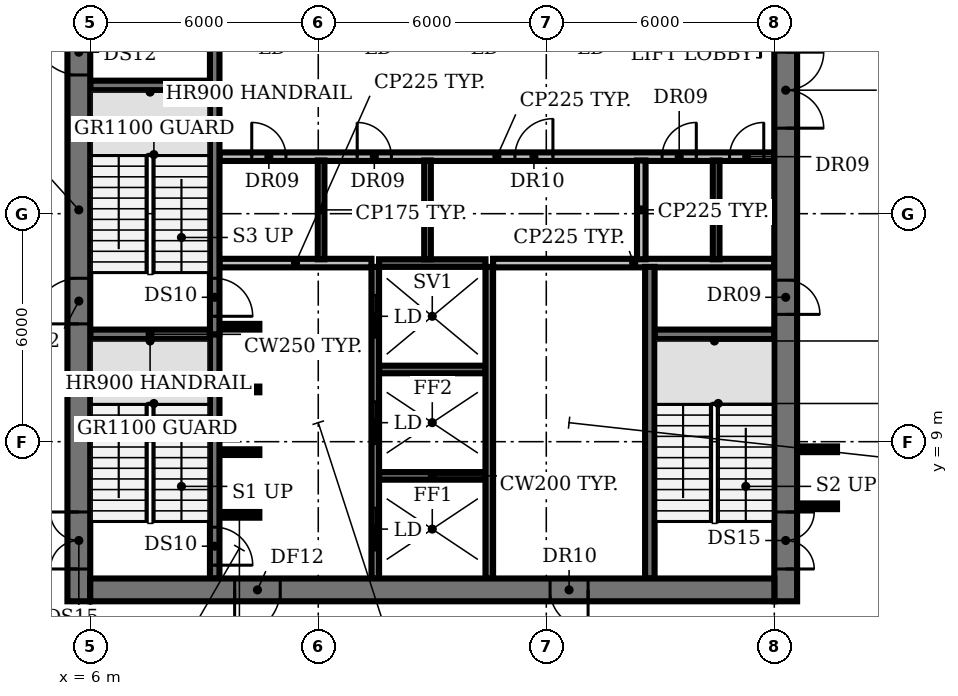
"""IFC4 building model, lengths in metres.
Left out: names, types, materials, properties, quantities, classifications, styles, units other than length and angle.
Written with IfcOpenShell. Run it as: python <this file> out.ifc"""

import sys

from ifc_helpers import new_model, si_unit, direction, frame, frame_2d, origin, place, context, subcontext, project, spatial, rectangle, extrude, element, fill, save


model = new_model("IFC4")
c1 = context("Model", 3, precision=1e-05, world=origin(), true_north=direction((0.0, 1.0)))
c2 = subcontext(c1, "Body", "Model", "MODEL_VIEW")
j1 = project(units=[si_unit("LENGTHUNIT", "METRE"), si_unit("PLANEANGLEUNIT", "RADIAN")], contexts=[c1])
p1 = place(None, origin())
s1 = spatial("IfcSite", under=j1, at=p1, CompositionType="ELEMENT")
p2 = place(p1, origin())
s2 = spatial("IfcBuilding", under=s1, at=p2, CompositionType="ELEMENT")
p3 = place(p2, frame((0.0, 0.0, 159.2)))
s3 = spatial("IfcBuildingStorey", under=s2, at=p3, CompositionType="ELEMENT", Elevation=159.2)
p4 = place(p3, frame((9.4, 7.075, 0.0), z_axis=(0.0, 0.0, 1.0), x_axis=(1.0, 0.0, 0.0)))
e1 = element("IfcWall", 1, at=p4, inside=s3, PredefinedType="SHEAR", context=c2, shape_type="SweptSolid", body=[
    extrude(rectangle(XDim=1.05, YDim=0.15, at=frame_2d((0.525, 0.0))), origin(), (0.0, 0.0, 1.0), 3.85),
])
p5 = place(p3, frame((13.6, 8.1, 0.0), z_axis=(0.0, 0.0, 1.0), x_axis=(1.0, 0.0, 0.0)))
e2 = element("IfcWall", 2, at=p5, inside=s3, PredefinedType="SHEAR", context=c2, shape_type="SweptSolid", body=[
    extrude(rectangle(XDim=2.8, YDim=0.2, at=frame_2d((1.4, 0.0))), origin(), (0.0, 0.0, 1.0), 3.85),
])
for number, where, z_axis, x_axis in (
    (3, (9.4, 8.725, 0.0), (0.0, 0.0, 1.0), (1.0, 0.0, 0.0)),
    (4, (9.4, 10.375, 0.0), (0.0, 0.0, 1.0), (1.0, 0.0, 0.0)),
):
    element("IfcWall", number, at=place(p3, frame(where, z_axis=z_axis, x_axis=x_axis)), inside=s3, PredefinedType="SHEAR", context=c2, shape_type="SweptSolid", body=[
        extrude(rectangle(XDim=1.05, YDim=0.15, at=frame_2d((0.525, 0.0))), origin(), (0.0, 0.0, 1.0), 3.85),
    ])
p6 = place(p3, frame((13.6, 10.9, 0.0), z_axis=(0.0, 0.0, 1.0), x_axis=(1.0, 0.0, 0.0)))
e5 = element("IfcWall", 5, at=p6, inside=s3, PredefinedType="SHEAR", context=c2, shape_type="SweptSolid", body=[
    extrude(rectangle(XDim=2.8, YDim=0.2, at=frame_2d((1.4, 0.0))), origin(), (0.0, 0.0, 1.0), 3.85),
])
for number, where, z_axis, x_axis in (
    (6, (6.0, 11.825, 0.0), (0.0, 0.0, 1.0), (1.0, 0.0, 0.0)),
    (7, (20.85, 11.825, 0.0), (0.0, 0.0, 1.0), (1.0, 0.0, 0.0)),
):
    element("IfcWall", number, at=place(p3, frame(where, z_axis=z_axis, x_axis=x_axis)), inside=s3, PredefinedType="SHEAR", context=c2, shape_type="SweptSolid", body=[
        extrude(rectangle(XDim=3.15, YDim=0.25, at=frame_2d((1.575, 0.0))), origin(), (0.0, 0.0, 1.0), 3.85),
    ])
p7 = place(p3, frame((9.4, 12.025, 0.0), z_axis=(0.0, 0.0, 1.0), x_axis=(1.0, 0.0, 0.0)))
e8 = element("IfcWall", 8, at=p7, inside=s3, PredefinedType="SHEAR", context=c2, shape_type="SweptSolid", body=[
    extrude(rectangle(XDim=1.05, YDim=0.15, at=frame_2d((0.525, 0.0))), origin(), (0.0, 0.0, 1.0), 3.85),
])
p8 = place(p3, frame((9.4, 13.7, 0.0), z_axis=(0.0, 0.0, 1.0), x_axis=(1.0, 0.0, 0.0)))
e9 = element("IfcWall", 9, at=p8, inside=s3, PredefinedType="PARTITIONING", context=c2, shape_type="SweptSolid", body=[
    extrude(rectangle(XDim=4.0, YDim=0.225, at=frame_2d((2.0, 0.0))), origin(), (0.0, 0.0, 1.0), 3.85),
])
p9 = place(p3, frame((13.6, 13.7, 0.0), z_axis=(0.0, 0.0, 1.0), x_axis=(1.0, 0.0, 0.0)))
e10 = element("IfcWall", 10, at=p9, inside=s3, PredefinedType="SHEAR", context=c2, shape_type="SweptSolid", body=[
    extrude(rectangle(XDim=2.8, YDim=0.2, at=frame_2d((1.4, 0.0))), origin(), (0.0, 0.0, 1.0), 3.85),
])
p10 = place(p3, frame((16.6, 13.7, 0.0), z_axis=(0.0, 0.0, 1.0), x_axis=(1.0, 0.0, 0.0)))
e11 = element("IfcWall", 11, at=p10, inside=s3, PredefinedType="PARTITIONING", context=c2, shape_type="SweptSolid", body=[
    extrude(rectangle(XDim=7.4, YDim=0.225, at=frame_2d((3.7, 0.0))), origin(), (0.0, 0.0, 1.0), 3.85),
])
p11 = place(p3, frame((9.4, 16.5, 0.0), z_axis=(0.0, 0.0, 1.0), x_axis=(1.0, 0.0, 0.0)))
e12 = element("IfcWall", 12, at=p11, inside=s3, PredefinedType="PARTITIONING", context=c2, shape_type="SweptSolid", body=[
    extrude(rectangle(XDim=14.6, YDim=0.225, at=frame_2d((7.3, 0.0))), origin(), (0.0, 0.0, 1.0), 3.85),
])
p12 = place(p11, frame((0.85, 0.0, 0.0)))
e13 = element("IfcOpeningElement", 13, at=p12, cuts=e12, PredefinedType="OPENING", context=c2, shape_type="SweptSolid", body=[
    extrude(rectangle(XDim=0.9, YDim=2.1, at=frame_2d((0.45, 1.05))), frame((0.0, 0.123, 0.0), z_axis=(0.0, -1.0, 0.0), x_axis=(1.0, 0.0, 0.0)), (0.0, 0.0, 1.0), 0.245),
])
p13 = place(p11, frame((3.625, 0.0, 0.0)))
e14 = element("IfcOpeningElement", 14, at=p13, cuts=e12, PredefinedType="OPENING", context=c2, shape_type="SweptSolid", body=[
    extrude(rectangle(XDim=0.9, YDim=2.1, at=frame_2d((0.45, 1.05))), frame((0.0, 0.123, 0.0), z_axis=(0.0, -1.0, 0.0), x_axis=(1.0, 0.0, 0.0)), (0.0, 0.0, 1.0), 0.245),
])
p14 = place(p11, frame((7.775, 0.0, 0.0)))
e15 = element("IfcOpeningElement", 15, at=p14, cuts=e12, PredefinedType="OPENING", context=c2, shape_type="SweptSolid", body=[
    extrude(rectangle(XDim=1.0, YDim=2.1, at=frame_2d((0.5, 1.05))), frame((0.0, 0.123, 0.0), z_axis=(0.0, -1.0, 0.0), x_axis=(1.0, 0.0, 0.0)), (0.0, 0.0, 1.0), 0.245),
])
p15 = place(p11, frame((11.647, 0.0, 0.0)))
e16 = element("IfcOpeningElement", 16, at=p15, cuts=e12, PredefinedType="OPENING", context=c2, shape_type="SweptSolid", body=[
    extrude(rectangle(XDim=0.9, YDim=2.1, at=frame_2d((0.45, 1.05))), frame((0.0, 0.123, 0.0), z_axis=(0.0, -1.0, 0.0), x_axis=(1.0, 0.0, 0.0)), (0.0, 0.0, 1.0), 0.245),
])
p16 = place(p11, frame((13.423, 0.0, 0.0)))
e17 = element("IfcOpeningElement", 17, at=p16, cuts=e12, PredefinedType="OPENING", context=c2, shape_type="SweptSolid", body=[
    extrude(rectangle(XDim=0.9, YDim=2.1, at=frame_2d((0.45, 1.05))), frame((0.0, 0.123, 0.0), z_axis=(0.0, -1.0, 0.0), x_axis=(1.0, 0.0, 0.0)), (0.0, 0.0, 1.0), 0.245),
])
p17 = place(p3, frame((6.0, 18.375, 0.0), z_axis=(0.0, 0.0, 1.0), x_axis=(1.0, 0.0, 0.0)))
e18 = element("IfcWall", 18, at=p17, inside=s3, PredefinedType="SHEAR", context=c2, shape_type="SweptSolid", body=[
    extrude(rectangle(XDim=3.15, YDim=0.25, at=frame_2d((1.575, 0.0))), origin(), (0.0, 0.0, 1.0), 3.85),
])
p18 = place(p3, frame((9.275, 11.825, 0.0), z_axis=(0.0, 0.0, 1.0), x_axis=(0.0, -1.0, 0.0)))
e19 = element("IfcWall", 19, at=p18, inside=s3, PredefinedType="SHEAR", context=c2, shape_type="SweptSolid", body=[
    extrude(rectangle(XDim=6.425, YDim=0.25, at=frame_2d((3.212, 0.0))), origin(), (0.0, 0.0, 1.0), 3.85),
])
p19 = place(p18, frame((5.075, 0.0, 0.0)))
e20 = element("IfcOpeningElement", 20, at=p19, cuts=e19, PredefinedType="OPENING", context=c2, shape_type="SweptSolid", body=[
    extrude(rectangle(XDim=1.0, YDim=2.1, at=frame_2d((0.5, 1.05))), frame((0.0, 0.135, 0.0), z_axis=(0.0, -1.0, 0.0), x_axis=(1.0, 0.0, 0.0)), (0.0, 0.0, 1.0), 0.27),
])
p20 = place(p3, frame((9.275, 18.375, 0.0), z_axis=(0.0, 0.0, 1.0), x_axis=(0.0, -1.0, 0.0)))
e21 = element("IfcWall", 21, at=p20, inside=s3, PredefinedType="SHEAR", context=c2, shape_type="SweptSolid", body=[
    extrude(rectangle(XDim=6.55, YDim=0.25, at=frame_2d((3.275, 0.0))), origin(), (0.0, 0.0, 1.0), 3.85),
])
p21 = place(p20, frame((5.075, 0.0, 0.0)))
e22 = element("IfcOpeningElement", 22, at=p21, cuts=e21, PredefinedType="OPENING", context=c2, shape_type="SweptSolid", body=[
    extrude(rectangle(XDim=1.0, YDim=2.1, at=frame_2d((0.5, 1.05))), frame((0.0, 0.135, 0.0), z_axis=(0.0, -1.0, 0.0), x_axis=(1.0, 0.0, 0.0)), (0.0, 0.0, 1.0), 0.27),
])
p22 = place(p3, frame((9.275, 18.375, 0.0), z_axis=(0.0, 0.0, 1.0), x_axis=(0.0, 1.0, 0.0)))
e23 = element("IfcWall", 23, at=p22, inside=s3, PredefinedType="SHEAR", context=c2, shape_type="SweptSolid", body=[
    extrude(rectangle(XDim=6.425, YDim=0.25, at=frame_2d((3.212, 0.0))), origin(), (0.0, 0.0, 1.0), 3.85),
])
p23 = place(p3, frame((12.075, 13.8, 0.0), z_axis=(0.0, 0.0, 1.0), x_axis=(0.0, 1.0, 0.0)))
e24 = element("IfcWall", 24, at=p23, inside=s3, PredefinedType="PARTITIONING", context=c2, shape_type="SweptSolid", body=[
    extrude(rectangle(XDim=2.6, YDim=0.175, at=frame_2d((1.3, 0.0))), origin(), (0.0, 0.0, 1.0), 3.85),
])
p24 = place(p3, frame((13.5, 5.4, 0.0), z_axis=(0.0, 0.0, 1.0), x_axis=(0.0, 1.0, 0.0)))
e25 = element("IfcWall", 25, at=p24, inside=s3, PredefinedType="SHEAR", context=c2, shape_type="SweptSolid", body=[
    extrude(rectangle(XDim=8.2, YDim=0.2, at=frame_2d((4.1, 0.0))), origin(), (0.0, 0.0, 1.0), 3.85),
])
p25 = place(p24, frame((0.75, 0.0, 0.0)))
e26 = element("IfcOpeningElement", 26, at=p25, cuts=e25, PredefinedType="OPENING", context=c2, shape_type="SweptSolid", body=[
    extrude(rectangle(XDim=1.1, YDim=2.1, at=frame_2d((0.55, 1.05))), frame((0.0, 0.11, 0.0), z_axis=(0.0, -1.0, 0.0), x_axis=(1.0, 0.0, 0.0)), (0.0, 0.0, 1.0), 0.22),
])
p26 = place(p24, frame((3.55, 0.0, 0.0)))
e27 = element("IfcOpeningElement", 27, at=p26, cuts=e25, PredefinedType="OPENING", context=c2, shape_type="SweptSolid", body=[
    extrude(rectangle(XDim=1.1, YDim=2.1, at=frame_2d((0.55, 1.05))), frame((0.0, 0.11, 0.0), z_axis=(0.0, -1.0, 0.0), x_axis=(1.0, 0.0, 0.0)), (0.0, 0.0, 1.0), 0.22),
])
p27 = place(p24, frame((6.35, 0.0, 0.0)))
e28 = element("IfcOpeningElement", 28, at=p27, cuts=e25, PredefinedType="OPENING", context=c2, shape_type="SweptSolid", body=[
    extrude(rectangle(XDim=1.1, YDim=2.1, at=frame_2d((0.55, 1.05))), frame((0.0, 0.11, 0.0), z_axis=(0.0, -1.0, 0.0), x_axis=(1.0, 0.0, 0.0)), (0.0, 0.0, 1.0), 0.22),
])
p28 = place(p3, frame((14.875, 13.8, 0.0), z_axis=(0.0, 0.0, 1.0), x_axis=(0.0, 1.0, 0.0)))
e29 = element("IfcWall", 29, at=p28, inside=s3, PredefinedType="PARTITIONING", context=c2, shape_type="SweptSolid", body=[
    extrude(rectangle(XDim=2.6, YDim=0.175, at=frame_2d((1.3, 0.0))), origin(), (0.0, 0.0, 1.0), 3.85),
])
p29 = place(p3, frame((16.5, 5.4, 0.0), z_axis=(0.0, 0.0, 1.0), x_axis=(0.0, 1.0, 0.0)))
e30 = element("IfcWall", 30, at=p29, inside=s3, PredefinedType="SHEAR", context=c2, shape_type="SweptSolid", body=[
    extrude(rectangle(XDim=8.2, YDim=0.2, at=frame_2d((4.1, 0.0))), origin(), (0.0, 0.0, 1.0), 3.85),
])
p30 = place(p3, frame((20.5, 13.8, 0.0), z_axis=(0.0, 0.0, 1.0), x_axis=(0.0, 1.0, 0.0)))
e31 = element("IfcWall", 31, at=p30, inside=s3, PredefinedType="PARTITIONING", context=c2, shape_type="SweptSolid", body=[
    extrude(rectangle(XDim=2.6, YDim=0.225, at=frame_2d((1.3, 0.0))), origin(), (0.0, 0.0, 1.0), 3.85),
])
p31 = place(p3, frame((20.725, 5.4, 0.0), z_axis=(0.0, 0.0, 1.0), x_axis=(0.0, 1.0, 0.0)))
e32 = element("IfcWall", 32, at=p31, inside=s3, PredefinedType="SHEAR", context=c2, shape_type="SweptSolid", body=[
    extrude(rectangle(XDim=8.2, YDim=0.25, at=frame_2d((4.1, 0.0))), origin(), (0.0, 0.0, 1.0), 3.85),
])
p32 = place(p3, frame((22.47, 13.8, 0.0), z_axis=(0.0, 0.0, 1.0), x_axis=(0.0, 1.0, 0.0)))
e33 = element("IfcWall", 33, at=p32, inside=s3, PredefinedType="PARTITIONING", context=c2, shape_type="SweptSolid", body=[
    extrude(rectangle(XDim=2.6, YDim=0.175, at=frame_2d((1.3, 0.0))), origin(), (0.0, 0.0, 1.0), 3.85),
])
p33 = place(p3, frame((5.7, 4.8, 0.0), z_axis=(0.0, 0.0, 1.0), x_axis=(0.0, 1.0, 0.0)))
e34 = element("IfcWall", 34, at=p33, inside=s3, PredefinedType="SHEAR", context=c2, shape_type="SweptSolid", body=[
    extrude(rectangle(XDim=20.6, YDim=0.6, at=frame_2d((10.3, 0.0))), origin(), (0.0, 0.0, 1.0), 3.85),
])
p34 = place(p33, frame((0.85, 0.0, 0.0)))
e35 = element("IfcOpeningElement", 35, at=p34, cuts=e34, PredefinedType="OPENING", context=c2, shape_type="SweptSolid", body=[
    extrude(rectangle(XDim=1.5, YDim=2.1, at=frame_2d((0.75, 1.05))), frame((0.0, 0.31, 0.0), z_axis=(0.0, -1.0, 0.0), x_axis=(1.0, 0.0, 0.0)), (0.0, 0.0, 1.0), 0.62),
])
p35 = place(p33, frame((7.3, 0.0, 0.0)))
e36 = element("IfcOpeningElement", 36, at=p35, cuts=e34, PredefinedType="OPENING", context=c2, shape_type="SweptSolid", body=[
    extrude(rectangle(XDim=1.2, YDim=2.1, at=frame_2d((0.6, 1.05))), frame((0.0, 0.31, 0.0), z_axis=(0.0, -1.0, 0.0), x_axis=(1.0, 0.0, 0.0)), (0.0, 0.0, 1.0), 0.62),
])
p36 = place(p33, frame((13.85, 0.0, 0.0)))
e37 = element("IfcOpeningElement", 37, at=p36, cuts=e34, PredefinedType="OPENING", context=c2, shape_type="SweptSolid", body=[
    extrude(rectangle(XDim=1.2, YDim=2.1, at=frame_2d((0.6, 1.05))), frame((0.0, 0.31, 0.0), z_axis=(0.0, -1.0, 0.0), x_axis=(1.0, 0.0, 0.0)), (0.0, 0.0, 1.0), 0.62),
])
p37 = place(p3, frame((24.3, 25.555, 0.0), z_axis=(0.0, 0.0, 1.0), x_axis=(0.0, -1.0, 0.0)))
e38 = element("IfcWall", 38, at=p37, inside=s3, PredefinedType="SHEAR", context=c2, shape_type="SweptSolid", body=[
    extrude(rectangle(XDim=20.755, YDim=0.6, at=frame_2d((10.377, 0.0))), origin(), (0.0, 0.0, 1.0), 3.85),
])
p38 = place(p37, frame((18.405, 0.0, 0.0)))
e39 = element("IfcOpeningElement", 39, at=p38, cuts=e38, PredefinedType="OPENING", context=c2, shape_type="SweptSolid", body=[
    extrude(rectangle(XDim=1.5, YDim=2.1, at=frame_2d((0.75, 1.05))), frame((0.0, 0.31, 0.0), z_axis=(0.0, -1.0, 0.0), x_axis=(1.0, 0.0, 0.0)), (0.0, 0.0, 1.0), 0.62),
])
p39 = place(p37, frame((12.305, 0.0, 0.0)))
e40 = element("IfcOpeningElement", 40, at=p39, cuts=e38, PredefinedType="OPENING", context=c2, shape_type="SweptSolid", body=[
    extrude(rectangle(XDim=0.9, YDim=2.1, at=frame_2d((0.45, 1.05))), frame((0.0, 0.31, 0.0), z_axis=(0.0, -1.0, 0.0), x_axis=(1.0, 0.0, 0.0)), (0.0, 0.0, 1.0), 0.62),
])
p40 = place(p37, frame((6.305, 0.0, 0.0)))
e41 = element("IfcOpeningElement", 41, at=p40, cuts=e38, PredefinedType="OPENING", context=c2, shape_type="SweptSolid", body=[
    extrude(rectangle(XDim=2.0, YDim=2.1, at=frame_2d((1.0, 1.05))), frame((0.0, 0.31, 0.0), z_axis=(0.0, -1.0, 0.0), x_axis=(1.0, 0.0, 0.0)), (0.0, 0.0, 1.0), 0.62),
])
p41 = place(p3, frame((24.0, 5.1, 0.0), z_axis=(0.0, 0.0, 1.0), x_axis=(-1.0, 0.0, 0.0)))
e42 = element("IfcWall", 42, at=p41, inside=s3, PredefinedType="SHEAR", context=c2, shape_type="SweptSolid", body=[
    extrude(rectangle(XDim=18.0, YDim=0.6, at=frame_2d((9.0, 0.0))), origin(), (0.0, 0.0, 1.0), 3.85),
])
p42 = place(p41, frame((13.0, 0.0, 0.0)))
e43 = element("IfcOpeningElement", 43, at=p42, cuts=e42, PredefinedType="OPENING", context=c2, shape_type="SweptSolid", body=[
    extrude(rectangle(XDim=1.2, YDim=2.1, at=frame_2d((0.6, 1.05))), frame((0.0, 0.31, 0.0), z_axis=(0.0, -1.0, 0.0), x_axis=(1.0, 0.0, 0.0)), (0.0, 0.0, 1.0), 0.62),
])
p43 = place(p41, frame((4.9, 0.0, 0.0)))
e44 = element("IfcOpeningElement", 44, at=p43, cuts=e42, PredefinedType="OPENING", context=c2, shape_type="SweptSolid", body=[
    extrude(rectangle(XDim=1.0, YDim=2.1, at=frame_2d((0.5, 1.05))), frame((0.0, 0.31, 0.0), z_axis=(0.0, -1.0, 0.0), x_axis=(1.0, 0.0, 0.0)), (0.0, 0.0, 1.0), 0.62),
])
for number, where, z_axis, x_axis in (
    (45, (24.6, 7.3, 0.0), (0.0, 0.0, 1.0), (1.0, 0.0, 0.0)),
    (46, (24.6, 8.8, 0.0), (0.0, 0.0, 1.0), (1.0, 0.0, 0.0)),
):
    element("IfcWall", number, at=place(p3, frame(where, z_axis=z_axis, x_axis=x_axis)), inside=s3, PredefinedType="PARTITIONING", context=c2, shape_type="SweptSolid", body=[
        extrude(rectangle(XDim=1.05, YDim=0.15, at=frame_2d((0.525, 0.0))), origin(), (0.0, 0.0, 1.0), 2.88),
    ])
p44 = place(p12, origin())
e47 = element("IfcDoor", 47, at=p44, inside=s3, OperationType="SINGLE_SWING_LEFT", PredefinedType="DOOR", context=c2, shape_type="SweptSolid", body=[
    extrude(rectangle(XDim=0.9, YDim=2.1, at=frame_2d((0.45, 1.05))), frame((0.0, 0.025, 0.0), z_axis=(0.0, -1.0, 0.0), x_axis=(1.0, 0.0, 0.0)), (0.0, 0.0, 1.0), 0.05),
])
fill(e13, e47)
p45 = place(p13, origin())
e48 = element("IfcDoor", 48, at=p45, inside=s3, OperationType="SINGLE_SWING_LEFT", PredefinedType="DOOR", context=c2, shape_type="SweptSolid", body=[
    extrude(rectangle(XDim=0.9, YDim=2.1, at=frame_2d((0.45, 1.05))), frame((0.0, 0.025, 0.0), z_axis=(0.0, -1.0, 0.0), x_axis=(1.0, 0.0, 0.0)), (0.0, 0.0, 1.0), 0.05),
])
fill(e14, e48)
p46 = place(p14, origin())
e49 = element("IfcDoor", 49, at=p46, inside=s3, OperationType="SINGLE_SWING_RIGHT", PredefinedType="DOOR", context=c2, shape_type="SweptSolid", body=[
    extrude(rectangle(XDim=1.0, YDim=2.1, at=frame_2d((0.5, 1.05))), frame((0.0, 0.025, 0.0), z_axis=(0.0, -1.0, 0.0), x_axis=(1.0, 0.0, 0.0)), (0.0, 0.0, 1.0), 0.05),
])
fill(e15, e49)
p47 = place(p15, origin())
e50 = element("IfcDoor", 50, at=p47, inside=s3, OperationType="SINGLE_SWING_RIGHT", PredefinedType="DOOR", context=c2, shape_type="SweptSolid", body=[
    extrude(rectangle(XDim=0.9, YDim=2.1, at=frame_2d((0.45, 1.05))), frame((0.0, 0.025, 0.0), z_axis=(0.0, -1.0, 0.0), x_axis=(1.0, 0.0, 0.0)), (0.0, 0.0, 1.0), 0.05),
])
fill(e16, e50)
p48 = place(p16, origin())
e51 = element("IfcDoor", 51, at=p48, inside=s3, OperationType="SINGLE_SWING_RIGHT", PredefinedType="DOOR", context=c2, shape_type="SweptSolid", body=[
    extrude(rectangle(XDim=0.9, YDim=2.1, at=frame_2d((0.45, 1.05))), frame((0.0, 0.025, 0.0), z_axis=(0.0, -1.0, 0.0), x_axis=(1.0, 0.0, 0.0)), (0.0, 0.0, 1.0), 0.05),
])
fill(e17, e51)
p49 = place(p19, origin())
e52 = element("IfcDoor", 52, at=p49, inside=s3, OperationType="SINGLE_SWING_RIGHT", PredefinedType="DOOR", context=c2, shape_type="SweptSolid", body=[
    extrude(rectangle(XDim=1.0, YDim=2.1, at=frame_2d((0.5, 1.05))), frame((0.0, 0.025, 0.0), z_axis=(0.0, -1.0, 0.0), x_axis=(1.0, 0.0, 0.0)), (0.0, 0.0, 1.0), 0.05),
])
fill(e20, e52)
p50 = place(p21, origin())
e53 = element("IfcDoor", 53, at=p50, inside=s3, OperationType="SINGLE_SWING_RIGHT", PredefinedType="DOOR", context=c2, shape_type="SweptSolid", body=[
    extrude(rectangle(XDim=1.0, YDim=2.1, at=frame_2d((0.5, 1.05))), frame((0.0, 0.025, 0.0), z_axis=(0.0, -1.0, 0.0), x_axis=(1.0, 0.0, 0.0)), (0.0, 0.0, 1.0), 0.05),
])
fill(e22, e53)
p51 = place(p25, origin())
e54 = element("IfcDoor", 54, at=p51, inside=s3, OperationType="DOUBLE_DOOR_SLIDING", PredefinedType="DOOR", context=c2, shape_type="SweptSolid", body=[
    extrude(rectangle(XDim=1.1, YDim=2.1, at=frame_2d((0.55, 1.05))), frame((0.0, 0.025, 0.0), z_axis=(0.0, -1.0, 0.0), x_axis=(1.0, 0.0, 0.0)), (0.0, 0.0, 1.0), 0.05),
])
fill(e26, e54)
p52 = place(p26, origin())
e55 = element("IfcDoor", 55, at=p52, inside=s3, OperationType="DOUBLE_DOOR_SLIDING", PredefinedType="DOOR", context=c2, shape_type="SweptSolid", body=[
    extrude(rectangle(XDim=1.1, YDim=2.1, at=frame_2d((0.55, 1.05))), frame((0.0, 0.025, 0.0), z_axis=(0.0, -1.0, 0.0), x_axis=(1.0, 0.0, 0.0)), (0.0, 0.0, 1.0), 0.05),
])
fill(e27, e55)
p53 = place(p27, origin())
e56 = element("IfcDoor", 56, at=p53, inside=s3, OperationType="DOUBLE_DOOR_SLIDING", PredefinedType="DOOR", context=c2, shape_type="SweptSolid", body=[
    extrude(rectangle(XDim=1.1, YDim=2.1, at=frame_2d((0.55, 1.05))), frame((0.0, 0.025, 0.0), z_axis=(0.0, -1.0, 0.0), x_axis=(1.0, 0.0, 0.0)), (0.0, 0.0, 1.0), 0.05),
])
fill(e28, e56)
p54 = place(p34, origin())
e57 = element("IfcDoor", 57, at=p54, inside=s3, OperationType="DOUBLE_DOOR_SINGLE_SWING", PredefinedType="DOOR", context=c2, shape_type="SweptSolid", body=[
    extrude(rectangle(XDim=1.5, YDim=2.1, at=frame_2d((0.75, 1.05))), frame((0.0, 0.025, 0.0), z_axis=(0.0, -1.0, 0.0), x_axis=(1.0, 0.0, 0.0)), (0.0, 0.0, 1.0), 0.05),
])
fill(e35, e57)
p55 = place(p35, origin())
e58 = element("IfcDoor", 58, at=p55, inside=s3, OperationType="SINGLE_SWING_LEFT", PredefinedType="DOOR", context=c2, shape_type="SweptSolid", body=[
    extrude(rectangle(XDim=1.2, YDim=2.1, at=frame_2d((0.6, 1.05))), frame((0.0, 0.025, 0.0), z_axis=(0.0, -1.0, 0.0), x_axis=(1.0, 0.0, 0.0)), (0.0, 0.0, 1.0), 0.05),
])
fill(e36, e58)
p56 = place(p36, origin())
e59 = element("IfcDoor", 59, at=p56, inside=s3, OperationType="SINGLE_SWING_RIGHT", PredefinedType="DOOR", context=c2, shape_type="SweptSolid", body=[
    extrude(rectangle(XDim=1.2, YDim=2.1, at=frame_2d((0.6, 1.05))), frame((0.0, 0.025, 0.0), z_axis=(0.0, -1.0, 0.0), x_axis=(1.0, 0.0, 0.0)), (0.0, 0.0, 1.0), 0.05),
])
fill(e37, e59)
p57 = place(p38, origin())
e60 = element("IfcDoor", 60, at=p57, inside=s3, OperationType="DOUBLE_DOOR_SINGLE_SWING", PredefinedType="DOOR", context=c2, shape_type="SweptSolid", body=[
    extrude(rectangle(XDim=1.5, YDim=2.1, at=frame_2d((0.75, 1.05))), frame((0.0, 0.025, 0.0), z_axis=(0.0, -1.0, 0.0), x_axis=(1.0, 0.0, 0.0)), (0.0, 0.0, 1.0), 0.05),
])
fill(e39, e60)
p58 = place(p39, origin())
e61 = element("IfcDoor", 61, at=p58, inside=s3, OperationType="SINGLE_SWING_RIGHT", PredefinedType="DOOR", context=c2, shape_type="SweptSolid", body=[
    extrude(rectangle(XDim=0.9, YDim=2.1, at=frame_2d((0.45, 1.05))), frame((0.0, -0.24, 0.0), z_axis=(0.0, -1.0, 0.0), x_axis=(1.0, 0.0, 0.0)), (0.0, 0.0, 1.0), 0.05),
])
fill(e40, e61)
p59 = place(p40, origin())
e62 = element("IfcDoor", 62, at=p59, inside=s3, OperationType="DOUBLE_DOOR_SINGLE_SWING", PredefinedType="DOOR", context=c2, shape_type="SweptSolid", body=[
    extrude(rectangle(XDim=2.0, YDim=2.1, at=frame_2d((1.0, 1.05))), frame((0.0, 0.025, 0.0), z_axis=(0.0, -1.0, 0.0), x_axis=(1.0, 0.0, 0.0)), (0.0, 0.0, 1.0), 0.05),
])
fill(e41, e62)
p60 = place(p42, origin())
e63 = element("IfcDoor", 63, at=p60, inside=s3, OperationType="SINGLE_SWING_RIGHT", PredefinedType="DOOR", context=c2, shape_type="SweptSolid", body=[
    extrude(rectangle(XDim=1.2, YDim=2.1, at=frame_2d((0.6, 1.05))), frame((0.0, 0.025, 0.0), z_axis=(0.0, -1.0, 0.0), x_axis=(1.0, 0.0, 0.0)), (0.0, 0.0, 1.0), 0.05),
])
fill(e43, e63)
p61 = place(p43, origin())
e64 = element("IfcDoor", 64, at=p61, inside=s3, OperationType="SINGLE_SWING_LEFT", PredefinedType="DOOR", context=c2, shape_type="SweptSolid", body=[
    extrude(rectangle(XDim=1.0, YDim=2.1, at=frame_2d((0.5, 1.05))), frame((0.0, -0.24, 0.0), z_axis=(0.0, -1.0, 0.0), x_axis=(1.0, 0.0, 0.0)), (0.0, 0.0, 1.0), 0.05),
])
fill(e44, e64)
save(model, sys.argv[1])
